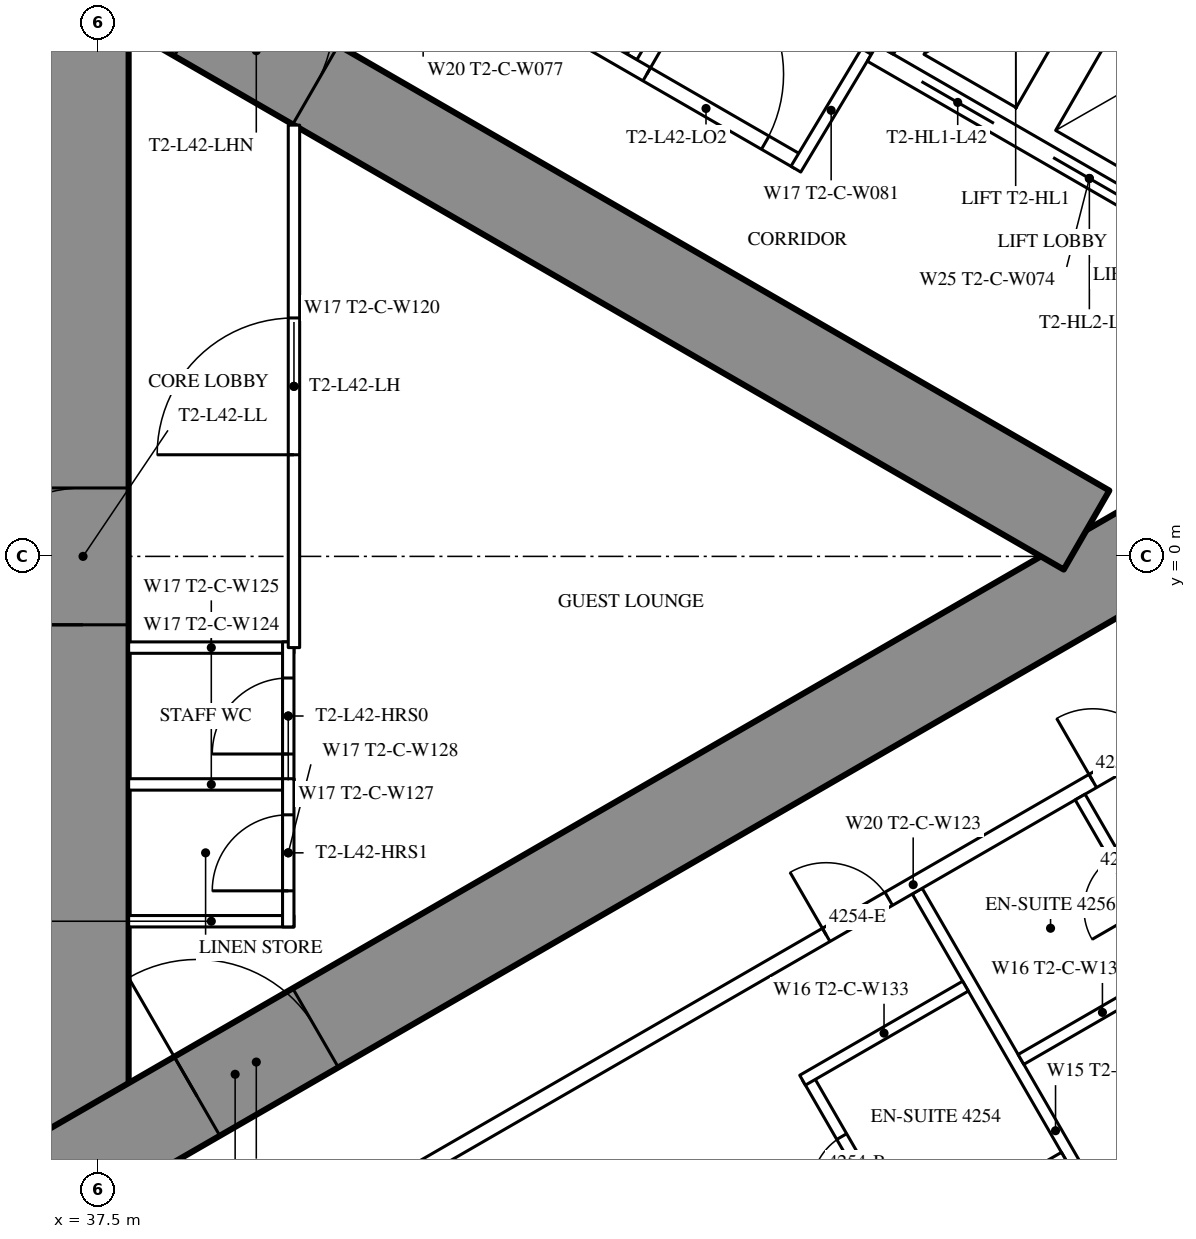
"""IFC4 building model, lengths in metres.
Left out: names, types, materials, properties, quantities, classifications, styles, units other than length and angle.
Written with IfcOpenShell. Run it as: python <this file> out.ifc"""

import sys

from ifc_helpers import new_model, si_unit, direction, frame, frame_2d, origin, place, context, subcontext, project, spatial, rectangle, extrude, element, fill, save


model = new_model("IFC4")
c1 = context("Model", 3, precision=1e-05, world=origin(), true_north=direction((0.0, 1.0)))
c2 = subcontext(c1, "Body", "Model", "MODEL_VIEW")
j1 = project(units=[si_unit("LENGTHUNIT", "METRE"), si_unit("PLANEANGLEUNIT", "RADIAN")], contexts=[c1])
p1 = place(None, origin())
s1 = spatial("IfcSite", under=j1, at=p1, CompositionType="ELEMENT")
p2 = place(p1, origin())
s2 = spatial("IfcBuilding", under=s1, at=p2, CompositionType="ELEMENT")
p3 = place(p2, frame((0.0, 0.0, 159.8)))
s3 = spatial("IfcBuildingStorey", under=s2, at=p3, CompositionType="ELEMENT", Elevation=159.8)
p4 = place(p3, frame((37.3, -8.6, 0.0), z_axis=(0.0, 0.0, 1.0), x_axis=(0.0, 1.0, 0.0)))
e1 = element("IfcWall", 1, at=p4, inside=s3, PredefinedType="SHEAR", context=c2, shape_type="SweptSolid", body=[
    extrude(rectangle(XDim=17.2, YDim=1.2, at=frame_2d((8.6, 0.0))), origin(), (0.0, 0.0, 1.0), 3.5),
])
p5 = place(p4, frame((7.7, 0.0, 0.0)))
e2 = element("IfcOpeningElement", 2, at=p5, cuts=e1, PredefinedType="OPENING", context=c2, shape_type="SweptSolid", body=[
    extrude(rectangle(XDim=1.8, YDim=2.2, at=frame_2d((0.9, 1.1))), frame((0.0, 0.61, 0.0), z_axis=(0.0, -1.0, 0.0), x_axis=(1.0, 0.0, 0.0)), (0.0, 0.0, 1.0), 1.22),
])
p6 = place(p3, frame((27.2, -13.8, 0.0), z_axis=(0.0, 0.0, 1.0), x_axis=(0.866027159892, 0.499996958321, 0.0)))
e3 = element("IfcWall", 3, at=p6, inside=s3, PredefinedType="SHEAR", context=c2, shape_type="SweptSolid", body=[
    extrude(rectangle(XDim=27.947, YDim=1.2, at=frame_2d((13.973, 0.0))), origin(), (0.0, 0.0, 1.0), 3.5),
])
p7 = place(p6, frame((4.6, 0.0, 0.0)))
e4 = element("IfcOpeningElement", 4, at=p7, cuts=e3, PredefinedType="OPENING", context=c2, shape_type="SweptSolid", body=[
    extrude(rectangle(XDim=1.0, YDim=2.2, at=frame_2d((0.5, 1.1))), frame((0.0, 0.61, 0.0), z_axis=(0.0, -1.0, 0.0), x_axis=(1.0, 0.0, 0.0)), (0.0, 0.0, 1.0), 1.22),
])
p8 = place(p6, frame((13.395, 0.0, 0.0)))
e5 = element("IfcOpeningElement", 5, at=p8, cuts=e3, PredefinedType="OPENING", context=c2, shape_type="SweptSolid", body=[
    extrude(rectangle(XDim=1.8, YDim=2.2, at=frame_2d((0.9, 1.1))), frame((0.0, 0.61, 0.0), z_axis=(0.0, -1.0, 0.0), x_axis=(1.0, 0.0, 0.0)), (0.0, 0.0, 1.0), 1.22),
])
p9 = place(p3, frame((27.2, 13.8, 0.0), z_axis=(0.0, 0.0, 1.0), x_axis=(0.866024515034, -0.500001539357, 0.0)))
e6 = element("IfcWall", 6, at=p9, inside=s3, PredefinedType="SHEAR", context=c2, shape_type="SweptSolid", body=[
    extrude(rectangle(XDim=26.907, YDim=1.2, at=frame_2d((13.454, 0.0))), origin(), (0.0, 0.0, 1.0), 3.5),
])
p10 = place(p9, frame((4.6, 0.0, 0.0)))
e7 = element("IfcOpeningElement", 7, at=p10, cuts=e6, PredefinedType="OPENING", context=c2, shape_type="SweptSolid", body=[
    extrude(rectangle(XDim=1.0, YDim=2.2, at=frame_2d((0.5, 1.1))), frame((0.0, 0.61, 0.0), z_axis=(0.0, -1.0, 0.0), x_axis=(1.0, 0.0, 0.0)), (0.0, 0.0, 1.0), 1.22),
])
p11 = place(p9, frame((13.395, 0.0, 0.0)))
e8 = element("IfcOpeningElement", 8, at=p11, cuts=e6, PredefinedType="OPENING", context=c2, shape_type="SweptSolid", body=[
    extrude(rectangle(XDim=1.8, YDim=2.2, at=frame_2d((0.9, 1.1))), frame((0.0, 0.61, 0.0), z_axis=(0.0, -1.0, 0.0), x_axis=(1.0, 0.0, 0.0)), (0.0, 0.0, 1.0), 1.22),
])
p12 = place(p3, frame((48.275, -4.404, 0.0), z_axis=(0.0, 0.0, 1.0), x_axis=(0.500006004368, -0.866021937133, 0.0)))
e9 = element("IfcWall", 9, at=p12, inside=s3, PredefinedType="PARTITIONING", context=c2, shape_type="SweptSolid", body=[
    extrude(rectangle(XDim=7.279, YDim=0.15, at=frame_2d((3.64, 0.0))), origin(), (0.0, 0.0, 1.0), 2.3),
])
p13 = place(p3, frame((44.521, 6.571, 0.0), z_axis=(0.0, 0.0, 1.0), x_axis=(0.500020376429, 0.866013639128, 0.0)))
e10 = element("IfcWall", 10, at=p13, inside=s3, PredefinedType="PARTITIONING", context=c2, shape_type="SweptSolid", body=[
    extrude(rectangle(XDim=7.306, YDim=0.15, at=frame_2d((3.653, 0.0))), origin(), (0.0, 0.0, 1.0), 2.3),
])
p14 = place(p3, frame((36.834, 10.894, 0.0), z_axis=(0.0, 0.0, 1.0), x_axis=(0.866031655879, -0.499989170898, 0.0)))
e11 = element("IfcWall", 11, at=p14, inside=s3, PredefinedType="PARTITIONING", context=c2, shape_type="SweptSolid", body=[
    extrude(rectangle(XDim=11.41, YDim=0.2, at=frame_2d((5.705, 0.0))), origin(), (0.0, 0.0, 1.0), 3.25),
])
p15 = place(p14, frame((5.144, 0.0, 0.0)))
e12 = element("IfcOpeningElement", 12, at=p15, cuts=e11, PredefinedType="OPENING", context=c2, shape_type="SweptSolid", body=[
    extrude(rectangle(XDim=0.95, YDim=2.2, at=frame_2d((0.475, 1.1))), frame((0.0, 0.11, 0.0), z_axis=(0.0, -1.0, 0.0), x_axis=(1.0, 0.0, 0.0)), (0.0, 0.0, 1.0), 0.22),
])
p16 = place(p14, frame((3.161, 0.0, 0.0)))
e13 = element("IfcOpeningElement", 13, at=p16, cuts=e11, PredefinedType="OPENING", context=c2, shape_type="SweptSolid", body=[
    extrude(rectangle(XDim=0.95, YDim=2.2, at=frame_2d((0.475, 1.1))), frame((0.0, 0.11, 0.0), z_axis=(0.0, -1.0, 0.0), x_axis=(1.0, 0.0, 0.0)), (0.0, 0.0, 1.0), 0.22),
])
p17 = place(p14, frame((9.102, 0.0, 0.0)))
e14 = element("IfcOpeningElement", 14, at=p17, cuts=e11, PredefinedType="OPENING", context=c2, shape_type="SweptSolid", body=[
    extrude(rectangle(XDim=1.8, YDim=2.2, at=frame_2d((0.9, 1.1))), frame((0.0, 0.11, 0.0), z_axis=(0.0, -1.0, 0.0), x_axis=(1.0, 0.0, 0.0)), (0.0, 0.0, 1.0), 0.22),
])
p18 = place(p3, frame((47.606, 6.643, 0.0), z_axis=(0.0, 0.0, 1.0), x_axis=(-0.514237157483, -0.857648031458, 0.0)))
e15 = element("IfcWall", 15, at=p18, inside=s3, PredefinedType="PARTITIONING", context=c2, shape_type="SweptSolid", body=[
    extrude(rectangle(XDim=1.805, YDim=0.15, at=frame_2d((0.902, 0.0))), origin(), (0.0, 0.0, 1.0), 3.25),
])
p19 = place(p3, frame((40.741, -8.638, 0.0), z_axis=(0.0, 0.0, 1.0), x_axis=(0.866022967338, 0.500004220025, 0.0)))
e16 = element("IfcWall", 16, at=p19, inside=s3, PredefinedType="PARTITIONING", context=c2, shape_type="SweptSolid", body=[
    extrude(rectangle(XDim=17.276, YDim=0.2, at=frame_2d((8.638, 0.0))), origin(), (0.0, 0.0, 1.0), 3.25),
])
p20 = place(p19, frame((7.316, 0.0, 0.0)))
e17 = element("IfcOpeningElement", 17, at=p20, cuts=e16, PredefinedType="OPENING", context=c2, shape_type="SweptSolid", body=[
    extrude(rectangle(XDim=0.95, YDim=2.2, at=frame_2d((0.475, 1.1))), frame((0.0, 0.11, 0.0), z_axis=(0.0, -1.0, 0.0), x_axis=(1.0, 0.0, 0.0)), (0.0, 0.0, 1.0), 0.22),
])
p21 = place(p19, frame((11.366, 0.0, 0.0)))
e18 = element("IfcOpeningElement", 18, at=p21, cuts=e16, PredefinedType="OPENING", context=c2, shape_type="SweptSolid", body=[
    extrude(rectangle(XDim=0.95, YDim=2.2, at=frame_2d((0.475, 1.1))), frame((0.0, 0.11, 0.0), z_axis=(0.0, -1.0, 0.0), x_axis=(1.0, 0.0, 0.0)), (0.0, 0.0, 1.0), 0.22),
])
p22 = place(p19, frame((13.347, 0.0, 0.0)))
e19 = element("IfcOpeningElement", 19, at=p22, cuts=e16, PredefinedType="OPENING", context=c2, shape_type="SweptSolid", body=[
    extrude(rectangle(XDim=0.95, YDim=2.2, at=frame_2d((0.475, 1.1))), frame((0.0, 0.11, 0.0), z_axis=(0.0, -1.0, 0.0), x_axis=(1.0, 0.0, 0.0)), (0.0, 0.0, 1.0), 0.22),
])
p23 = place(p3, frame((48.066, -9.143, 0.0), z_axis=(0.0, 0.0, 1.0), x_axis=(0.866006523861, 0.500032699561, 0.0)))
e20 = element("IfcWall", 20, at=p23, inside=s3, PredefinedType="PARTITIONING", context=c2, shape_type="SweptSolid", body=[
    extrude(rectangle(XDim=2.475, YDim=0.15, at=frame_2d((1.237, 0.0))), origin(), (0.0, 0.0, 1.0), 3.25),
])
p24 = place(p3, frame((46.831, -6.854, 0.0), z_axis=(0.0, 0.0, 1.0), x_axis=(0.500006934395, -0.866021400173, 0.0)))
e21 = element("IfcWall", 21, at=p24, inside=s3, PredefinedType="PARTITIONING", context=c2, shape_type="SweptSolid", body=[
    extrude(rectangle(XDim=2.6, YDim=0.15, at=frame_2d((1.3, 0.0))), origin(), (0.0, 0.0, 1.0), 3.25),
])
p25 = place(p24, frame((0.9, 0.0, 0.0)))
e22 = element("IfcOpeningElement", 22, at=p25, cuts=e21, PredefinedType="OPENING", context=c2, shape_type="SweptSolid", body=[
    extrude(rectangle(XDim=0.8, YDim=2.2, at=frame_2d((0.4, 1.1))), frame((0.0, 0.085, 0.0), z_axis=(0.0, -1.0, 0.0), x_axis=(1.0, 0.0, 0.0)), (0.0, 0.0, 1.0), 0.17),
])
for number, where, z_axis, x_axis in (
    (23, (46.766, -6.891, 0.0), (0.0, 0.0, 1.0), (0.866, 0.5, 0.0)),
    (24, (49.64, -6.618, 0.0), (0.0, 0.0, 1.0), (0.866, 0.5, 0.0)),
):
    element("IfcWall", number, at=place(p3, frame(where, z_axis=z_axis, x_axis=x_axis)), inside=s3, PredefinedType="PARTITIONING", context=c2, shape_type="SweptSolid", body=[
        extrude(rectangle(XDim=2.475, YDim=0.15, at=frame_2d((1.237, 0.0))), origin(), (0.0, 0.0, 1.0), 3.25),
    ])
p26 = place(p3, frame((50.418, -3.166, 0.0), z_axis=(0.0, 0.0, 1.0), x_axis=(0.499936506574, -0.866062058628, 0.0)))
e25 = element("IfcWall", 25, at=p26, inside=s3, PredefinedType="PARTITIONING", context=c2, shape_type="SweptSolid", body=[
    extrude(rectangle(XDim=2.6, YDim=0.15, at=frame_2d((1.3, 0.0))), origin(), (0.0, 0.0, 1.0), 3.25),
])
p27 = place(p26, frame((0.9, 0.0, 0.0)))
e26 = element("IfcOpeningElement", 26, at=p27, cuts=e25, PredefinedType="OPENING", context=c2, shape_type="SweptSolid", body=[
    extrude(rectangle(XDim=0.8, YDim=2.2, at=frame_2d((0.4, 1.1))), frame((0.0, 0.085, 0.0), z_axis=(0.0, -1.0, 0.0), x_axis=(1.0, 0.0, 0.0)), (0.0, 0.0, 1.0), 0.17),
])
for number, where, z_axis, x_axis in (
    (27, (37.9, -1.2, 0.0), (0.0, 0.0, 1.0), (1.0, 0.0, 0.0)),
    (28, (37.9, -3.0, 0.0), (0.0, 0.0, 1.0), (1.0, 0.0, 0.0)),
    (29, (37.9, -4.8, 0.0), (0.0, 0.0, 1.0), (1.0, 0.0, 0.0)),
):
    element("IfcWall", number, at=place(p3, frame(where, z_axis=z_axis, x_axis=x_axis)), inside=s3, PredefinedType="PARTITIONING", context=c2, shape_type="SweptSolid", body=[
        extrude(rectangle(XDim=2.175, YDim=0.15, at=frame_2d((1.087, 0.0))), origin(), (0.0, 0.0, 1.0), 3.25),
    ])
p28 = place(p3, frame((40.0, -3.075, 0.0), z_axis=(0.0, 0.0, 1.0), x_axis=(0.0, 1.0, 0.0)))
e30 = element("IfcWall", 30, at=p28, inside=s3, PredefinedType="PARTITIONING", context=c2, shape_type="SweptSolid", body=[
    extrude(rectangle(XDim=1.95, YDim=0.15, at=frame_2d((0.975, 0.0))), origin(), (0.0, 0.0, 1.0), 3.25),
])
p29 = place(p28, frame((0.475, 0.0, 0.0)))
e31 = element("IfcOpeningElement", 31, at=p29, cuts=e30, PredefinedType="OPENING", context=c2, shape_type="SweptSolid", body=[
    extrude(rectangle(XDim=1.0, YDim=2.2, at=frame_2d((0.5, 1.1))), frame((0.0, 0.085, 0.0), z_axis=(0.0, -1.0, 0.0), x_axis=(1.0, 0.0, 0.0)), (0.0, 0.0, 1.0), 0.17),
])
p30 = place(p3, frame((40.0, -4.875, 0.0), z_axis=(0.0, 0.0, 1.0), x_axis=(0.0, 1.0, 0.0)))
e32 = element("IfcWall", 32, at=p30, inside=s3, PredefinedType="PARTITIONING", context=c2, shape_type="SweptSolid", body=[
    extrude(rectangle(XDim=1.95, YDim=0.15, at=frame_2d((0.975, 0.0))), origin(), (0.0, 0.0, 1.0), 3.25),
])
p31 = place(p30, frame((0.475, 0.0, 0.0)))
e33 = element("IfcOpeningElement", 33, at=p31, cuts=e32, PredefinedType="OPENING", context=c2, shape_type="SweptSolid", body=[
    extrude(rectangle(XDim=1.0, YDim=2.2, at=frame_2d((0.5, 1.1))), frame((0.0, 0.085, 0.0), z_axis=(0.0, -1.0, 0.0), x_axis=(1.0, 0.0, 0.0)), (0.0, 0.0, 1.0), 0.17),
])
p32 = place(p3, frame((40.075, -1.2, 0.0), z_axis=(0.0, 0.0, 1.0), x_axis=(0.0, 1.0, 0.0)))
e34 = element("IfcWall", 34, at=p32, inside=s3, PredefinedType="PARTITIONING", context=c2, shape_type="SweptSolid", body=[
    extrude(rectangle(XDim=6.874, YDim=0.15, at=frame_2d((3.437, 0.0))), origin(), (0.0, 0.0, 1.0), 3.25),
])
p33 = place(p32, frame((2.537, 0.0, 0.0)))
e35 = element("IfcOpeningElement", 35, at=p33, cuts=e34, PredefinedType="OPENING", context=c2, shape_type="SweptSolid", body=[
    extrude(rectangle(XDim=1.8, YDim=2.2, at=frame_2d((0.9, 1.1))), frame((0.0, 0.085, 0.0), z_axis=(0.0, -1.0, 0.0), x_axis=(1.0, 0.0, 0.0)), (0.0, 0.0, 1.0), 0.17),
])
p34 = place(p3, frame((47.681, 6.622, 0.0), z_axis=(0.0, 0.0, 1.0), x_axis=(0.86603344179, -0.499986077507, 0.0)))
e36 = element("IfcWall", 36, at=p34, inside=s3, PredefinedType="PARTITIONING", context=c2, shape_type="SweptSolid", body=[
    extrude(rectangle(XDim=6.6, YDim=0.25, at=frame_2d((3.3, 0.0))), origin(), (0.0, 0.0, 1.0), 3.25),
])
p35 = place(p34, frame((0.75, 0.0, 0.0)))
e37 = element("IfcOpeningElement", 37, at=p35, cuts=e36, PredefinedType="OPENING", context=c2, shape_type="SweptSolid", body=[
    extrude(rectangle(XDim=1.1, YDim=2.2, at=frame_2d((0.55, 1.1))), frame((0.0, 0.135, 0.0), z_axis=(0.0, -1.0, 0.0), x_axis=(1.0, 0.0, 0.0)), (0.0, 0.0, 1.0), 0.27),
])
p36 = place(p34, frame((2.75, 0.0, 0.0)))
e38 = element("IfcOpeningElement", 38, at=p36, cuts=e36, PredefinedType="OPENING", context=c2, shape_type="SweptSolid", body=[
    extrude(rectangle(XDim=1.1, YDim=2.2, at=frame_2d((0.55, 1.1))), frame((0.0, 0.135, 0.0), z_axis=(0.0, -1.0, 0.0), x_axis=(1.0, 0.0, 0.0)), (0.0, 0.0, 1.0), 0.27),
])
p37 = place(p34, frame((4.75, 0.0, 0.0)))
e39 = element("IfcOpeningElement", 39, at=p37, cuts=e36, PredefinedType="OPENING", context=c2, shape_type="SweptSolid", body=[
    extrude(rectangle(XDim=1.1, YDim=2.2, at=frame_2d((0.55, 1.1))), frame((0.0, 0.135, 0.0), z_axis=(0.0, -1.0, 0.0), x_axis=(1.0, 0.0, 0.0)), (0.0, 0.0, 1.0), 0.27),
])
p38 = place(p3, frame((49.406, 9.611, 0.0), z_axis=(0.0, 0.0, 1.0), x_axis=(0.86603344179, -0.499986077507, 0.0)))
e40 = element("IfcWall", 40, at=p38, inside=s3, PredefinedType="PARTITIONING", context=c2, shape_type="SweptSolid", body=[
    extrude(rectangle(XDim=6.6, YDim=0.25, at=frame_2d((3.3, 0.0))), origin(), (0.0, 0.0, 1.0), 3.25),
])
p39 = place(p3, frame((47.852, 6.668, 0.0), z_axis=(0.0, 0.0, 1.0), x_axis=(0.499929347863, 0.866066190972, 0.0)))
e41 = element("IfcWall", 41, at=p39, inside=s3, PredefinedType="PARTITIONING", context=c2, shape_type="SweptSolid", body=[
    extrude(rectangle(XDim=3.201, YDim=0.25, at=frame_2d((1.6, 0.0))), origin(), (0.0, 0.0, 1.0), 3.25),
])
p40 = place(p25, origin())
e42 = element("IfcDoor", 42, at=p40, inside=s3, OperationType="SINGLE_SWING_RIGHT", PredefinedType="DOOR", context=c2, shape_type="SweptSolid", body=[
    extrude(rectangle(XDim=0.8, YDim=2.2, at=frame_2d((0.4, 1.1))), frame((0.0, 0.025, 0.0), z_axis=(0.0, -1.0, 0.0), x_axis=(1.0, 0.0, 0.0)), (0.0, 0.0, 1.0), 0.05),
])
fill(e22, e42)
p41 = place(p20, origin())
e43 = element("IfcDoor", 43, at=p41, inside=s3, OperationType="SINGLE_SWING_LEFT", PredefinedType="DOOR", context=c2, shape_type="SweptSolid", body=[
    extrude(rectangle(XDim=0.95, YDim=2.2, at=frame_2d((0.475, 1.1))), frame((0.0, 0.025, 0.0), z_axis=(0.0, -1.0, 0.0), x_axis=(1.0, 0.0, 0.0)), (0.0, 0.0, 1.0), 0.05),
])
fill(e17, e43)
p42 = place(p27, origin())
e44 = element("IfcDoor", 44, at=p42, inside=s3, OperationType="SINGLE_SWING_RIGHT", PredefinedType="DOOR", context=c2, shape_type="SweptSolid", body=[
    extrude(rectangle(XDim=0.8, YDim=2.2, at=frame_2d((0.4, 1.1))), frame((0.0, 0.025, 0.0), z_axis=(0.0, -1.0, 0.0), x_axis=(1.0, 0.0, 0.0)), (0.0, 0.0, 1.0), 0.05),
])
fill(e26, e44)
p43 = place(p21, origin())
e45 = element("IfcDoor", 45, at=p43, inside=s3, OperationType="SINGLE_SWING_LEFT", PredefinedType="DOOR", context=c2, shape_type="SweptSolid", body=[
    extrude(rectangle(XDim=0.95, YDim=2.2, at=frame_2d((0.475, 1.1))), frame((0.0, 0.025, 0.0), z_axis=(0.0, -1.0, 0.0), x_axis=(1.0, 0.0, 0.0)), (0.0, 0.0, 1.0), 0.05),
])
fill(e18, e45)
p44 = place(p17, origin())
e46 = element("IfcDoor", 46, at=p44, inside=s3, OperationType="DOUBLE_DOOR_SINGLE_SWING", PredefinedType="DOOR", context=c2, shape_type="SweptSolid", body=[
    extrude(rectangle(XDim=1.8, YDim=2.2, at=frame_2d((0.9, 1.1))), frame((0.0, 0.025, 0.0), z_axis=(0.0, -1.0, 0.0), x_axis=(1.0, 0.0, 0.0)), (0.0, 0.0, 1.0), 0.05),
])
fill(e14, e46)
p45 = place(p29, origin())
e47 = element("IfcDoor", 47, at=p45, inside=s3, OperationType="SINGLE_SWING_LEFT", PredefinedType="DOOR", context=c2, shape_type="SweptSolid", body=[
    extrude(rectangle(XDim=1.0, YDim=2.2, at=frame_2d((0.5, 1.1))), frame((0.0, 0.025, 0.0), z_axis=(0.0, -1.0, 0.0), x_axis=(1.0, 0.0, 0.0)), (0.0, 0.0, 1.0), 0.05),
])
fill(e31, e47)
p46 = place(p31, origin())
e48 = element("IfcDoor", 48, at=p46, inside=s3, OperationType="SINGLE_SWING_LEFT", PredefinedType="DOOR", context=c2, shape_type="SweptSolid", body=[
    extrude(rectangle(XDim=1.0, YDim=2.2, at=frame_2d((0.5, 1.1))), frame((0.0, 0.025, 0.0), z_axis=(0.0, -1.0, 0.0), x_axis=(1.0, 0.0, 0.0)), (0.0, 0.0, 1.0), 0.05),
])
fill(e33, e48)
p47 = place(p33, origin())
e49 = element("IfcDoor", 49, at=p47, inside=s3, OperationType="DOUBLE_DOOR_SINGLE_SWING", PredefinedType="DOOR", context=c2, shape_type="SweptSolid", body=[
    extrude(rectangle(XDim=1.8, YDim=2.2, at=frame_2d((0.9, 1.1))), frame((0.0, 0.025, 0.0), z_axis=(0.0, -1.0, 0.0), x_axis=(1.0, 0.0, 0.0)), (0.0, 0.0, 1.0), 0.05),
])
fill(e35, e49)
p48 = place(p8, origin())
e50 = element("IfcDoor", 50, at=p48, inside=s3, OperationType="DOUBLE_DOOR_SINGLE_SWING", PredefinedType="DOOR", context=c2, shape_type="SweptSolid", body=[
    extrude(rectangle(XDim=1.8, YDim=2.2, at=frame_2d((0.9, 1.1))), frame((0.0, 0.025, 0.0), z_axis=(0.0, -1.0, 0.0), x_axis=(1.0, 0.0, 0.0)), (0.0, 0.0, 1.0), 0.05),
])
fill(e5, e50)
p49 = place(p11, origin())
e51 = element("IfcDoor", 51, at=p49, inside=s3, OperationType="DOUBLE_DOOR_SINGLE_SWING", PredefinedType="DOOR", context=c2, shape_type="SweptSolid", body=[
    extrude(rectangle(XDim=1.8, YDim=2.2, at=frame_2d((0.9, 1.1))), frame((0.0, 0.025, 0.0), z_axis=(0.0, -1.0, 0.0), x_axis=(1.0, 0.0, 0.0)), (0.0, 0.0, 1.0), 0.05),
])
fill(e8, e51)
p50 = place(p5, origin())
e52 = element("IfcDoor", 52, at=p50, inside=s3, OperationType="DOUBLE_DOOR_SINGLE_SWING", PredefinedType="DOOR", context=c2, shape_type="SweptSolid", body=[
    extrude(rectangle(XDim=1.8, YDim=2.2, at=frame_2d((0.9, 1.1))), frame((0.0, 0.025, 0.0), z_axis=(0.0, -1.0, 0.0), x_axis=(1.0, 0.0, 0.0)), (0.0, 0.0, 1.0), 0.05),
])
fill(e2, e52)
p51 = place(p35, origin())
e53 = element("IfcDoor", 53, at=p51, inside=s3, OperationType="DOUBLE_DOOR_SLIDING", PredefinedType="USERDEFINED", context=c2, shape_type="SweptSolid", body=[
    extrude(rectangle(XDim=1.1, YDim=2.2, at=frame_2d((0.55, 1.1))), frame((0.0, 0.025, 0.0), z_axis=(0.0, -1.0, 0.0), x_axis=(1.0, 0.0, 0.0)), (0.0, 0.0, 1.0), 0.05),
])
fill(e37, e53)
p52 = place(p36, origin())
e54 = element("IfcDoor", 54, at=p52, inside=s3, OperationType="DOUBLE_DOOR_SLIDING", PredefinedType="USERDEFINED", context=c2, shape_type="SweptSolid", body=[
    extrude(rectangle(XDim=1.1, YDim=2.2, at=frame_2d((0.55, 1.1))), frame((0.0, 0.025, 0.0), z_axis=(0.0, -1.0, 0.0), x_axis=(1.0, 0.0, 0.0)), (0.0, 0.0, 1.0), 0.05),
])
fill(e38, e54)
save(model, sys.argv[1])
